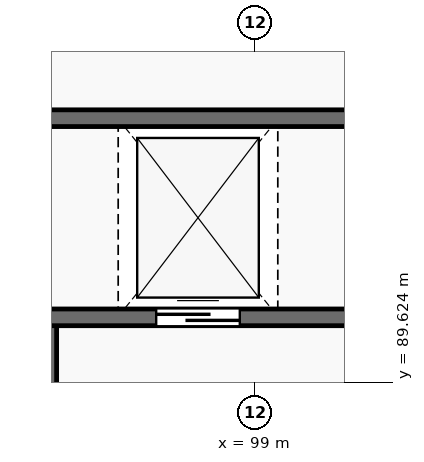
"""IFC4 building model, lengths in metres.
Left out: names, types, materials, properties, quantities, classifications, styles, units other than length and angle.
Written with IfcOpenShell. Run it as: python <this file> out.ifc"""

import sys

from ifc_helpers import new_model, si_unit, direction, frame, frame_2d, origin, place, context, subcontext, project, spatial, rectangle, extrude, element, fill, save


model = new_model("IFC4")
c1 = context("Model", 3, precision=1e-05, world=origin(), true_north=direction((0.0, 1.0)))
c2 = subcontext(c1, "Body", "Model", "MODEL_VIEW")
j1 = project(units=[si_unit("LENGTHUNIT", "METRE"), si_unit("PLANEANGLEUNIT", "RADIAN")], contexts=[c1])
p1 = place(None, origin())
s1 = spatial("IfcSite", under=j1, at=p1, CompositionType="ELEMENT")
p2 = place(p1, origin())
s2 = spatial("IfcBuilding", under=s1, at=p2, CompositionType="ELEMENT")
p3 = place(p2, frame((0.0, 0.0, 15.0)))
s3 = spatial("IfcBuildingStorey", under=s2, at=p3, CompositionType="ELEMENT", Elevation=15.0)
p4 = place(p3, frame((96.27, 86.4, 0.0), z_axis=(0.0, 0.0, 1.0), x_axis=(0.0, 1.0, 0.0)))
e1 = element("IfcWall", 1, at=p4, inside=s3, PredefinedType="SHEAR", context=c2, shape_type="SweptSolid", body=[
    extrude(rectangle(XDim=4.0, YDim=0.24, at=frame_2d((2.0, 0.0))), origin(), (0.0, 0.0, 1.0), 3.9),
])
p5 = place(p4, frame((1.3, 0.0, 0.0)))
e2 = element("IfcOpeningElement", 2, at=p5, cuts=e1, PredefinedType="OPENING", context=c2, shape_type="SweptSolid", body=[
    extrude(rectangle(XDim=1.4, YDim=2.2, at=frame_2d((0.7, 1.1))), frame((0.0, 0.135, 0.0), z_axis=(0.0, -1.0, 0.0), x_axis=(1.0, 0.0, 0.0)), (0.0, 0.0, 1.0), 0.27),
])
p6 = place(p3, frame((96.17, 90.48, 0.0), z_axis=(0.0, 0.0, 1.0), x_axis=(1.0, 0.0, 0.0)))
e3 = element("IfcWall", 3, at=p6, inside=s3, PredefinedType="SHEAR", context=c2, shape_type="SweptSolid", body=[
    extrude(rectangle(XDim=4.16, YDim=0.22, at=frame_2d((2.08, 0.0))), origin(), (0.0, 0.0, 1.0), 3.9),
])
p7 = place(p6, frame((1.53, 0.0, 0.0)))
e4 = element("IfcOpeningElement", 4, at=p7, cuts=e3, PredefinedType="OPENING", context=c2, shape_type="SweptSolid", body=[
    extrude(rectangle(XDim=1.1, YDim=2.15, at=frame_2d((0.55, 1.075))), frame((0.0, 0.125, 0.0), z_axis=(0.0, -1.0, 0.0), x_axis=(1.0, 0.0, 0.0)), (0.0, 0.0, 1.0), 0.25),
])
p8 = place(p3, frame((96.17, 93.1, 0.0), z_axis=(0.0, 0.0, 1.0), x_axis=(1.0, 0.0, 0.0)))
e5 = element("IfcWall", 5, at=p8, inside=s3, PredefinedType="SHEAR", context=c2, shape_type="SweptSolid", body=[
    extrude(rectangle(XDim=4.16, YDim=0.22, at=frame_2d((2.08, 0.0))), origin(), (0.0, 0.0, 1.0), 3.9),
])
p9 = place(p7, origin())
e6 = element("IfcDoor", 6, at=p9, inside=s3, OperationType="SLIDING_TO_LEFT", PredefinedType="DOOR", context=c2, shape_type="SweptSolid", body=[
    extrude(rectangle(XDim=1.1, YDim=2.15, at=frame_2d((0.55, 1.075))), frame((0.0, 0.025, 0.0), z_axis=(0.0, -1.0, 0.0), x_axis=(1.0, 0.0, 0.0)), (0.0, 0.0, 1.0), 0.05),
])
fill(e4, e6)
save(model, sys.argv[1])
